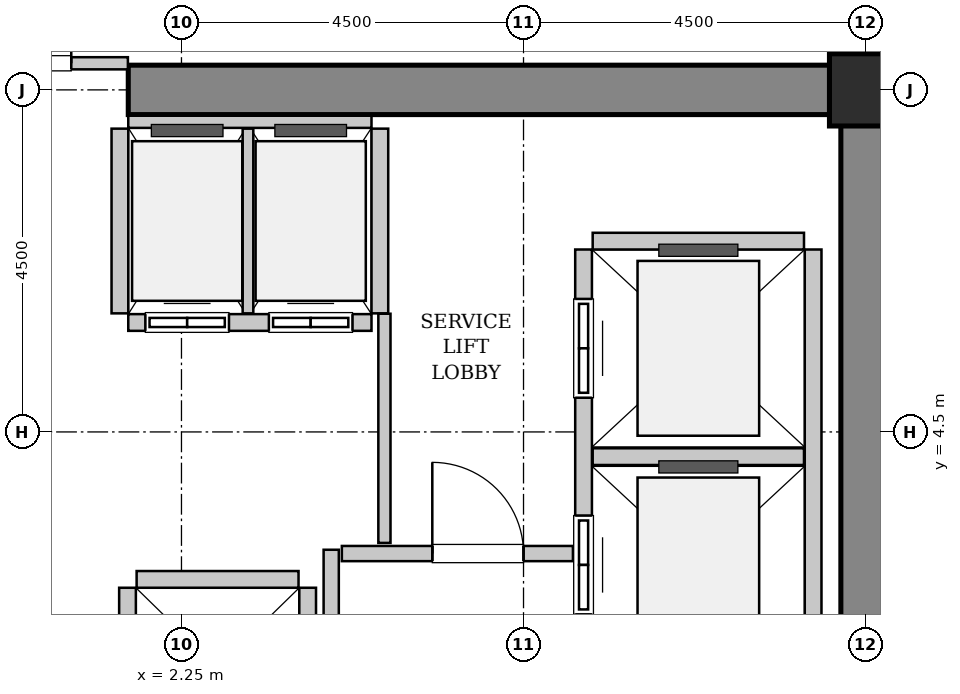
"""IFC4 building model, lengths in metres.
Left out: names, types, materials, properties, quantities, classifications, styles, units other than length and angle.
Written with IfcOpenShell. Run it as: python <this file> out.ifc"""

import sys

from ifc_helpers import new_model, si_unit, direction, frame, frame_2d, origin, origin_2d, place, context, subcontext, project, spatial, rectangle, hollow_rectangle, extrude, source, transform, mapped, element, fill, save


model = new_model("IFC4")
c1 = context("Model", 3, precision=1e-05, world=origin(), true_north=direction((0.0, 1.0)))
c2 = subcontext(c1, "Body", "Model", "MODEL_VIEW")
j1 = project(units=[si_unit("LENGTHUNIT", "METRE"), si_unit("PLANEANGLEUNIT", "RADIAN")], contexts=[c1])
p1 = place(None, origin())
s1 = spatial("IfcSite", under=j1, at=p1, CompositionType="ELEMENT")
p2 = place(p1, origin())
s2 = spatial("IfcBuilding", under=s1, at=p2, CompositionType="ELEMENT")
p3 = place(p2, frame((0.0, 0.0, 67.2)))
s3 = spatial("IfcBuildingStorey", under=s2, at=p3, CompositionType="ELEMENT", Elevation=67.2)
m1 = source(origin(), c2, "Body", "SweptSolid", [
    extrude(rectangle(XDim=10.025, YDim=0.65, at=frame_2d((5.012, 0.0))), origin(), (0.0, 0.0, 1.0), 3.8),
])
p4 = place(p3, frame((1.55, 9.0, 0.0), z_axis=(0.0, 0.0, 1.0), x_axis=(1.0, 0.0, 0.0)))
e1 = element("IfcWall", 1, at=p4, inside=s3, PredefinedType="SHEAR", context=c2, shape_type="MappedRepresentation", body=[
    mapped(m1, transform((0.0, 0.0, 0.0), x_axis=(1.0, 0.0, 0.0), y_axis=(0.0, 1.0, 0.0), z_axis=(0.0, 0.0, 1.0), scale=1.0)),
])
m2 = source(origin(), c2, "Body", "SweptSolid", [
    extrude(rectangle(XDim=7.325, YDim=0.65, at=frame_2d((3.663, 0.0))), origin(), (0.0, 0.0, 1.0), 3.8),
])
p5 = place(p3, frame((11.25, 1.35, 0.0), z_axis=(0.0, 0.0, 1.0), x_axis=(0.0, 1.0, 0.0)))
e2 = element("IfcWall", 2, at=p5, inside=s3, PredefinedType="SHEAR", context=c2, shape_type="MappedRepresentation", body=[
    mapped(m2, transform((0.0, 0.0, 0.0), x_axis=(1.0, 0.0, 0.0), y_axis=(0.0, 1.0, 0.0), z_axis=(0.0, 0.0, 1.0), scale=1.0)),
])
m3 = source(origin(), c2, "Body", "SweptSolid", [
    extrude(hollow_rectangle(XDim=0.95, YDim=0.95, WallThickness=0.045, InnerFilletRadius=0.045, OuterFilletRadius=0.09, at=origin_2d()), origin(), (0.0, 0.0, 1.0), 3.8),
])
p6 = place(p3, frame((11.25, 9.0, 0.0), z_axis=(0.0, 0.0, 1.0), x_axis=(1.0, 0.0, 0.0)))
e3 = element("IfcColumn", 3, at=p6, inside=s3, PredefinedType="COLUMN", context=c2, shape_type="MappedRepresentation", body=[
    mapped(m3, transform((0.0, 0.0, 0.0), x_axis=(1.0, 0.0, 0.0), y_axis=(0.0, 1.0, 0.0), z_axis=(0.0, 0.0, 1.0), scale=1.0)),
])
m4 = source(origin(), c2, "Body", "SweptSolid", [
    extrude(rectangle(XDim=5.45, YDim=0.22, at=frame_2d((2.725, 0.0))), origin(), (0.0, 0.0, 1.0), 3.535),
])
p7 = place(p3, frame((7.54, 6.9, 0.0), z_axis=(0.0, 0.0, 1.0), x_axis=(0.0, -1.0, 0.0)))
e4 = element("IfcWall", 4, at=p7, inside=s3, PredefinedType="SOLIDWALL", context=c2, shape_type="MappedRepresentation", body=[
    mapped(m4, transform((0.0, 0.0, 0.0), x_axis=(1.0, 0.0, 0.0), y_axis=(0.0, 1.0, 0.0), z_axis=(0.0, 0.0, 1.0), scale=1.0)),
])
p8 = place(p7, frame((3.5, 0.0, 0.0)))
e5 = element("IfcOpeningElement", 5, at=p8, cuts=e4, PredefinedType="OPENING", context=c2, shape_type="SweptSolid", body=[
    extrude(rectangle(XDim=1.3, YDim=2.3, at=frame_2d((0.65, 1.15))), frame((0.0, 0.12, 0.0), z_axis=(0.0, -1.0, 0.0), x_axis=(1.0, 0.0, 0.0)), (0.0, 0.0, 1.0), 0.24),
])
p9 = place(p7, frame((0.65, 0.0, 0.0)))
e6 = element("IfcOpeningElement", 6, at=p9, cuts=e4, PredefinedType="OPENING", context=c2, shape_type="SweptSolid", body=[
    extrude(rectangle(XDim=1.3, YDim=2.3, at=frame_2d((0.65, 1.15))), frame((0.0, 0.12, 0.0), z_axis=(0.0, -1.0, 0.0), x_axis=(1.0, 0.0, 0.0)), (0.0, 0.0, 1.0), 0.24),
])
p10 = place(p3, frame((10.56, 1.45, 0.0), z_axis=(0.0, 0.0, 1.0), x_axis=(0.0, 1.0, 0.0)))
e7 = element("IfcWall", 7, at=p10, inside=s3, PredefinedType="SOLIDWALL", context=c2, shape_type="MappedRepresentation", body=[
    mapped(m4, transform((0.0, 0.0, 0.0), x_axis=(1.0, 0.0, 0.0), y_axis=(0.0, 1.0, 0.0), z_axis=(0.0, 0.0, 1.0), scale=1.0)),
])
m5 = source(origin(), c2, "Body", "SweptSolid", [
    extrude(rectangle(XDim=2.78, YDim=0.22, at=frame_2d((1.39, 0.0))), origin(), (0.0, 0.0, 1.0), 3.535),
])
for number, where, z_axis, x_axis in (
    (8, (7.66, 4.175, 0.0), (0.0, 0.0, 1.0), (1.0, 0.0, 0.0)),
    (9, (10.44, 7.01, 0.0), (0.0, 0.0, 1.0), (-1.0, 0.0, 0.0)),
):
    element("IfcWall", number, at=place(p3, frame(where, z_axis=z_axis, x_axis=x_axis)), inside=s3, PredefinedType="SOLIDWALL", context=c2, shape_type="MappedRepresentation", body=[
        mapped(m5, transform((0.0, 0.0, 0.0), x_axis=(1.0, 0.0, 0.0), y_axis=(0.0, 1.0, 0.0), z_axis=(0.0, 0.0, 1.0), scale=1.0)),
    ])
m6 = source(origin(), c2, "Body", "SweptSolid", [
    extrude(rectangle(XDim=3.2, YDim=0.22, at=frame_2d((1.6, 0.0))), origin(), (0.0, 0.0, 1.0), 3.535),
])
p11 = place(p3, frame((1.55, 5.94, 0.0), z_axis=(0.0, 0.0, 1.0), x_axis=(1.0, 0.0, 0.0)))
e10 = element("IfcWall", 10, at=p11, inside=s3, PredefinedType="SOLIDWALL", context=c2, shape_type="MappedRepresentation", body=[
    mapped(m6, transform((0.0, 0.0, 0.0), x_axis=(1.0, 0.0, 0.0), y_axis=(0.0, 1.0, 0.0), z_axis=(0.0, 0.0, 1.0), scale=1.0)),
])
p12 = place(p11, frame((0.225, 0.0, 0.0)))
e11 = element("IfcOpeningElement", 11, at=p12, cuts=e10, PredefinedType="OPENING", context=c2, shape_type="SweptSolid", body=[
    extrude(rectangle(XDim=1.1, YDim=2.2, at=frame_2d((0.55, 1.1))), frame((0.0, 0.12, 0.0), z_axis=(0.0, -1.0, 0.0), x_axis=(1.0, 0.0, 0.0)), (0.0, 0.0, 1.0), 0.24),
])
p13 = place(p11, frame((1.85, 0.0, 0.0)))
e12 = element("IfcOpeningElement", 12, at=p13, cuts=e10, PredefinedType="OPENING", context=c2, shape_type="SweptSolid", body=[
    extrude(rectangle(XDim=1.1, YDim=2.2, at=frame_2d((0.55, 1.1))), frame((0.0, 0.12, 0.0), z_axis=(0.0, -1.0, 0.0), x_axis=(1.0, 0.0, 0.0)), (0.0, 0.0, 1.0), 0.24),
])
m7 = source(origin(), c2, "Body", "SweptSolid", [
    extrude(rectangle(XDim=3.2, YDim=0.16, at=frame_2d((1.6, 0.0))), origin(), (0.0, 0.0, 1.0), 2.425),
])
p14 = place(p3, frame((4.75, 8.58, 0.0), z_axis=(0.0, 0.0, 1.0), x_axis=(-1.0, 0.0, 0.0)))
e13 = element("IfcWall", 13, at=p14, inside=s3, PredefinedType="PARTITIONING", context=c2, shape_type="MappedRepresentation", body=[
    mapped(m7, transform((0.0, 0.0, 0.0), x_axis=(1.0, 0.0, 0.0), y_axis=(0.0, 1.0, 0.0), z_axis=(0.0, 0.0, 1.0), scale=1.0)),
])
m8 = source(origin(), c2, "Body", "SweptSolid", [
    extrude(rectangle(XDim=2.43, YDim=0.22, at=frame_2d((1.215, 0.0))), origin(), (0.0, 0.0, 1.0), 3.535),
])
p15 = place(p3, frame((1.44, 8.49, 0.0), z_axis=(0.0, 0.0, 1.0), x_axis=(0.0, -1.0, 0.0)))
e14 = element("IfcWall", 14, at=p15, inside=s3, PredefinedType="SOLIDWALL", context=c2, shape_type="MappedRepresentation", body=[
    mapped(m8, transform((0.0, 0.0, 0.0), x_axis=(1.0, 0.0, 0.0), y_axis=(0.0, 1.0, 0.0), z_axis=(0.0, 0.0, 1.0), scale=1.0)),
])
m9 = source(origin(), c2, "Body", "SweptSolid", [
    extrude(rectangle(XDim=2.43, YDim=0.14, at=frame_2d((1.215, 0.0))), origin(), (0.0, 0.0, 1.0), 3.535),
])
p16 = place(p3, frame((3.125, 6.06, 0.0), z_axis=(0.0, 0.0, 1.0), x_axis=(0.0, 1.0, 0.0)))
e15 = element("IfcWall", 15, at=p16, inside=s3, PredefinedType="PARTITIONING", context=c2, shape_type="MappedRepresentation", body=[
    mapped(m9, transform((0.0, 0.0, 0.0), x_axis=(1.0, 0.0, 0.0), y_axis=(0.0, 1.0, 0.0), z_axis=(0.0, 0.0, 1.0), scale=1.0)),
])
p17 = place(p3, frame((4.86, 6.06, 0.0), z_axis=(0.0, 0.0, 1.0), x_axis=(0.0, 1.0, 0.0)))
e16 = element("IfcWall", 16, at=p17, inside=s3, PredefinedType="SOLIDWALL", context=c2, shape_type="MappedRepresentation", body=[
    mapped(m8, transform((0.0, 0.0, 0.0), x_axis=(1.0, 0.0, 0.0), y_axis=(0.0, 1.0, 0.0), z_axis=(0.0, 0.0, 1.0), scale=1.0)),
])
m10 = source(origin(), c2, "Body", "SweptSolid", [
    extrude(rectangle(XDim=4.9, YDim=0.22, at=frame_2d((2.45, 0.0))), origin(), (0.0, 0.0, 1.0), 3.535),
])
for number, where, z_axis, x_axis in (
    (17, (1.54, 2.45, 0.0), (0.0, 0.0, 1.0), (0.0, -1.0, 0.0)),
    (18, (3.91, -2.45, 0.0), (0.0, 0.0, 1.0), (0.0, 1.0, 0.0)),
):
    element("IfcWall", number, at=place(p3, frame(where, z_axis=z_axis, x_axis=x_axis)), inside=s3, PredefinedType="SOLIDWALL", context=c2, shape_type="MappedRepresentation", body=[
        mapped(m10, transform((0.0, 0.0, 0.0), x_axis=(1.0, 0.0, 0.0), y_axis=(0.0, 1.0, 0.0), z_axis=(0.0, 0.0, 1.0), scale=1.0)),
    ])
m11 = source(origin(), c2, "Body", "SweptSolid", [
    extrude(rectangle(XDim=2.13, YDim=0.22, at=frame_2d((1.065, 0.0))), origin(), (0.0, 0.0, 1.0), 3.535),
])
p18 = place(p3, frame((3.79, 2.56, 0.0), z_axis=(0.0, 0.0, 1.0), x_axis=(-1.0, 0.0, 0.0)))
e19 = element("IfcWall", 19, at=p18, inside=s3, PredefinedType="SOLIDWALL", context=c2, shape_type="MappedRepresentation", body=[
    mapped(m11, transform((0.0, 0.0, 0.0), x_axis=(1.0, 0.0, 0.0), y_axis=(0.0, 1.0, 0.0), z_axis=(0.0, 0.0, 1.0), scale=1.0)),
])
m12 = source(origin(), c2, "Body", "SweptSolid", [
    extrude(rectangle(XDim=5.9, YDim=0.2, at=frame_2d((2.95, 0.0))), origin(), (0.0, 0.0, 1.0), 3.535),
])
p19 = place(p3, frame((4.22, -2.95, 0.0), z_axis=(0.0, 0.0, 1.0), x_axis=(0.0, 1.0, 0.0)))
e20 = element("IfcWall", 20, at=p19, inside=s3, PredefinedType="PARTITIONING", context=c2, shape_type="MappedRepresentation", body=[
    mapped(m12, transform((0.0, 0.0, 0.0), x_axis=(1.0, 0.0, 0.0), y_axis=(0.0, 1.0, 0.0), z_axis=(0.0, 0.0, 1.0), scale=1.0)),
])
m13 = source(origin(), c2, "Body", "SweptSolid", [
    extrude(rectangle(XDim=3.04, YDim=0.2, at=frame_2d((1.52, 0.0))), origin(), (0.0, 0.0, 1.0), 3.535),
])
p20 = place(p3, frame((4.36, 2.9, 0.0), z_axis=(0.0, 0.0, 1.0), x_axis=(1.0, 0.0, 0.0)))
e21 = element("IfcWall", 21, at=p20, inside=s3, PredefinedType="PARTITIONING", context=c2, shape_type="MappedRepresentation", body=[
    mapped(m13, transform((0.0, 0.0, 0.0), x_axis=(1.0, 0.0, 0.0), y_axis=(0.0, 1.0, 0.0), z_axis=(0.0, 0.0, 1.0), scale=1.0)),
])
p21 = place(p20, frame((1.19, 0.0, 0.0)))
e22 = element("IfcOpeningElement", 22, at=p21, cuts=e21, PredefinedType="OPENING", context=c2, shape_type="SweptSolid", body=[
    extrude(rectangle(XDim=1.2, YDim=2.15, at=frame_2d((0.6, 1.075))), frame((0.0, 0.11, 0.0), z_axis=(0.0, -1.0, 0.0), x_axis=(1.0, 0.0, 0.0)), (0.0, 0.0, 1.0), 0.22),
])
m14 = source(origin(), c2, "Body", "SweptSolid", [
    extrude(rectangle(XDim=3.09, YDim=0.16, at=frame_2d((1.545, 0.0))), origin(), (0.0, 0.0, 1.0), 2.425),
])
p22 = place(p3, frame((-1.545, 9.35, 0.0), z_axis=(0.0, 0.0, 1.0), x_axis=(1.0, 0.0, 0.0)))
e23 = element("IfcWall", 23, at=p22, inside=s3, PredefinedType="PARTITIONING", context=c2, shape_type="MappedRepresentation", body=[
    mapped(m14, transform((0.0, 0.0, 0.0), x_axis=(1.0, 0.0, 0.0), y_axis=(0.0, 1.0, 0.0), z_axis=(0.0, 0.0, 1.0), scale=1.0)),
])
p23 = place(p22, frame((0.745, 0.0, 0.0)))
e24 = element("IfcOpeningElement", 24, at=p23, cuts=e23, PredefinedType="OPENING", context=c2, shape_type="SweptSolid", body=[
    extrude(rectangle(XDim=1.6, YDim=2.3, at=frame_2d((0.8, 1.15))), frame((0.0, 0.09, 0.0), z_axis=(0.0, -1.0, 0.0), x_axis=(1.0, 0.0, 0.0)), (0.0, 0.0, 1.0), 0.18),
])
m15 = source(origin(), c2, "Body", "SweptSolid", [
    extrude(rectangle(XDim=3.015, YDim=0.16, at=frame_2d((1.507, 0.0))), origin(), (0.0, 0.0, 1.0), 3.535),
])
p24 = place(p3, frame((4.92, 3.04, 0.0), z_axis=(0.0, 0.0, 1.0), x_axis=(0.0, 1.0, 0.0)))
e25 = element("IfcWall", 25, at=p24, inside=s3, PredefinedType="PARTITIONING", context=c2, shape_type="MappedRepresentation", body=[
    mapped(m15, transform((0.0, 0.0, 0.0), x_axis=(1.0, 0.0, 0.0), y_axis=(0.0, 1.0, 0.0), z_axis=(0.0, 0.0, 1.0), scale=1.0)),
])
m16 = source(origin(), c2, "Body", "SweptSolid", [
    extrude(rectangle(XDim=1.3, YDim=2.3, at=frame_2d((0.65, 1.15))), frame((0.0, 0.025, 0.0), z_axis=(0.0, -1.0, 0.0), x_axis=(1.0, 0.0, 0.0)), (0.0, 0.0, 1.0), 0.05),
])
p25 = place(p8, origin())
e26 = element("IfcDoor", 26, at=p25, inside=s3, OperationType="SLIDING_TO_RIGHT", PredefinedType="DOOR", context=c2, shape_type="MappedRepresentation", body=[
    mapped(m16, transform((0.0, 0.0, 0.0), x_axis=(1.0, 0.0, 0.0), y_axis=(0.0, 1.0, 0.0), z_axis=(0.0, 0.0, 1.0), scale=1.0)),
])
fill(e5, e26)
p26 = place(p9, origin())
e27 = element("IfcDoor", 27, at=p26, inside=s3, OperationType="SLIDING_TO_RIGHT", PredefinedType="DOOR", context=c2, shape_type="MappedRepresentation", body=[
    mapped(m16, transform((0.0, 0.0, 0.0), x_axis=(1.0, 0.0, 0.0), y_axis=(0.0, 1.0, 0.0), z_axis=(0.0, 0.0, 1.0), scale=1.0)),
])
fill(e6, e27)
m17 = source(origin(), c2, "Body", "SweptSolid", [
    extrude(rectangle(XDim=1.1, YDim=2.2, at=frame_2d((0.55, 1.1))), frame((0.0, 0.025, 0.0), z_axis=(0.0, -1.0, 0.0), x_axis=(1.0, 0.0, 0.0)), (0.0, 0.0, 1.0), 0.05),
])
p27 = place(p12, origin())
e28 = element("IfcDoor", 28, at=p27, inside=s3, OperationType="DOUBLE_DOOR_SLIDING", PredefinedType="DOOR", context=c2, shape_type="MappedRepresentation", body=[
    mapped(m17, transform((0.0, 0.0, 0.0), x_axis=(1.0, 0.0, 0.0), y_axis=(0.0, 1.0, 0.0), z_axis=(0.0, 0.0, 1.0), scale=1.0)),
])
fill(e11, e28)
p28 = place(p13, origin())
e29 = element("IfcDoor", 29, at=p28, inside=s3, OperationType="DOUBLE_DOOR_SLIDING", PredefinedType="DOOR", context=c2, shape_type="MappedRepresentation", body=[
    mapped(m17, transform((0.0, 0.0, 0.0), x_axis=(1.0, 0.0, 0.0), y_axis=(0.0, 1.0, 0.0), z_axis=(0.0, 0.0, 1.0), scale=1.0)),
])
fill(e12, e29)
m18 = source(origin(), c2, "Body", "SweptSolid", [
    extrude(rectangle(XDim=1.2, YDim=2.15, at=frame_2d((0.6, 1.075))), frame((0.0, 0.025, 0.0), z_axis=(0.0, -1.0, 0.0), x_axis=(1.0, 0.0, 0.0)), (0.0, 0.0, 1.0), 0.05),
])
p29 = place(p21, origin())
e30 = element("IfcDoor", 30, at=p29, inside=s3, OperationType="SINGLE_SWING_LEFT", PredefinedType="DOOR", context=c2, shape_type="MappedRepresentation", body=[
    mapped(m18, transform((0.0, 0.0, 0.0), x_axis=(1.0, 0.0, 0.0), y_axis=(0.0, 1.0, 0.0), z_axis=(0.0, 0.0, 1.0), scale=1.0)),
])
fill(e22, e30)
m19 = source(origin(), c2, "Body", "SweptSolid", [
    extrude(rectangle(XDim=1.6, YDim=2.3, at=frame_2d((0.8, 1.15))), frame((0.0, 0.025, 0.0), z_axis=(0.0, -1.0, 0.0), x_axis=(1.0, 0.0, 0.0)), (0.0, 0.0, 1.0), 0.05),
])
p30 = place(p23, origin())
e31 = element("IfcDoor", 31, at=p30, inside=s3, OperationType="DOUBLE_DOOR_SINGLE_SWING", PredefinedType="DOOR", context=c2, shape_type="MappedRepresentation", body=[
    mapped(m19, transform((0.0, 0.0, 0.0), x_axis=(1.0, 0.0, 0.0), y_axis=(0.0, 1.0, 0.0), z_axis=(0.0, 0.0, 1.0), scale=1.0)),
])
fill(e24, e31)
save(model, sys.argv[1])
